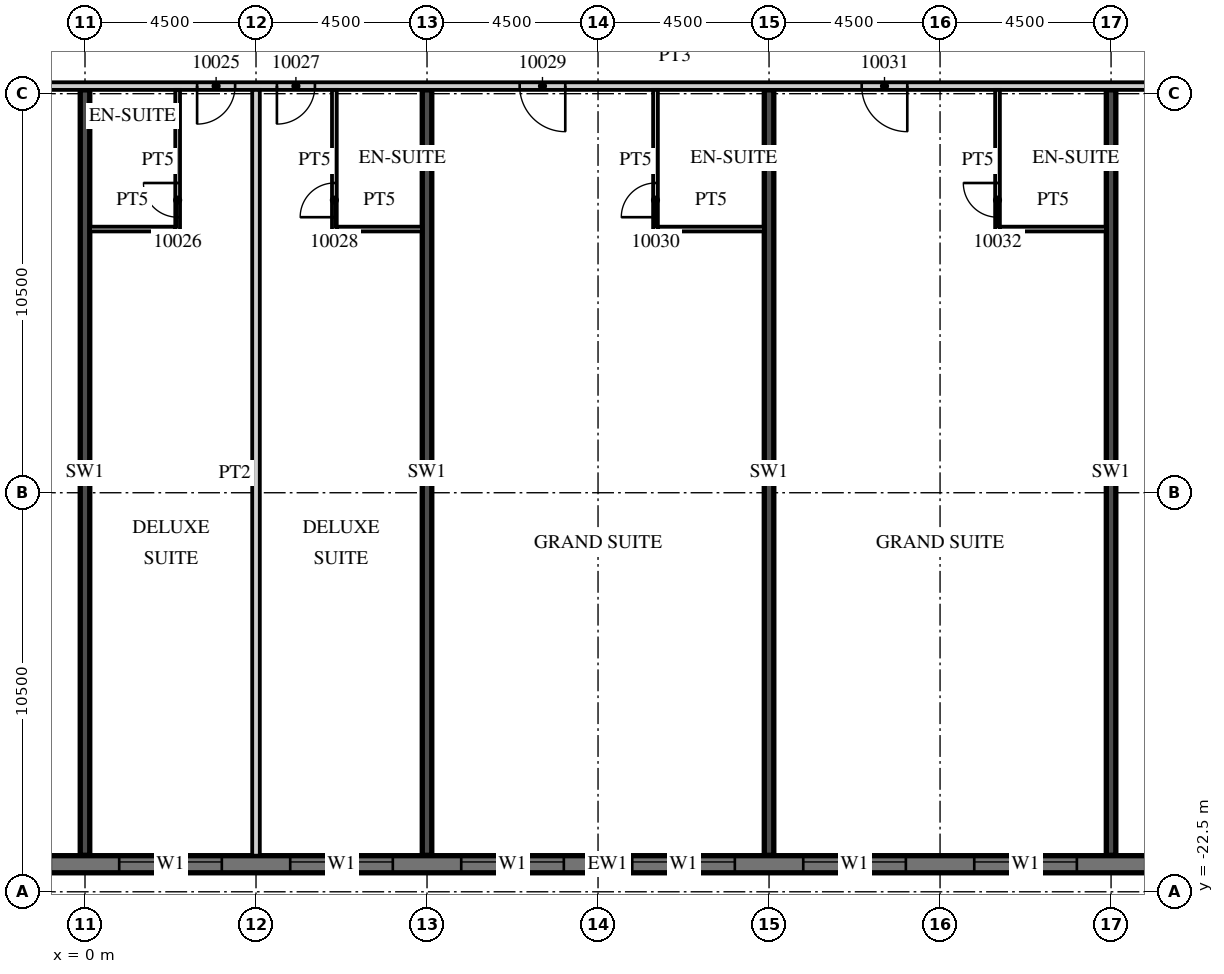
"""IFC4 building model, lengths in metres.
Left out: names, types, materials, properties, quantities, classifications, styles, units other than length and angle.
Written with IfcOpenShell. Run it as: python <this file> out.ifc"""

import sys

from ifc_helpers import new_model, si_unit, direction, frame, frame_2d, origin, place, context, subcontext, project, spatial, rectangle, extrude, element, fill, save


model = new_model("IFC4")
c1 = context("Model", 3, precision=1e-05, world=origin(), true_north=direction((0.0, 1.0)))
c2 = subcontext(c1, "Body", "Model", "MODEL_VIEW")
j1 = project(units=[si_unit("LENGTHUNIT", "METRE"), si_unit("PLANEANGLEUNIT", "RADIAN")], contexts=[c1])
p1 = place(None, origin())
s1 = spatial("IfcSite", under=j1, at=p1, CompositionType="ELEMENT")
p2 = place(p1, origin())
s2 = spatial("IfcBuilding", under=s1, at=p2, CompositionType="ELEMENT")
p3 = place(p2, frame((0.0, 0.0, 63.3)))
s3 = spatial("IfcBuildingStorey", under=s2, at=p3, CompositionType="ELEMENT", Elevation=63.3)
for number, where, z_axis, x_axis in (
    (1, (0.0, -21.54, 0.0), (0.0, 0.0, 1.0), (0.0, 1.0, 0.0)),
    (2, (9.0, -21.54, 0.0), (0.0, 0.0, 1.0), (0.0, 1.0, 0.0)),
    (3, (18.0, -21.54, 0.0), (0.0, 0.0, 1.0), (0.0, 1.0, 0.0)),
    (4, (27.0, -21.54, 0.0), (0.0, 0.0, 1.0), (0.0, 1.0, 0.0)),
):
    element("IfcWall", number, at=place(p3, frame(where, z_axis=z_axis, x_axis=x_axis)), inside=s3, PredefinedType="SHEAR", context=c2, shape_type="SweptSolid", body=[
        extrude(rectangle(XDim=20.14, YDim=0.25, at=frame_2d((10.07, 0.0))), origin(), (0.0, 0.0, 1.0), 3.3),
    ])
p4 = place(p3, frame((-13.5, -21.775, 0.0), z_axis=(0.0, 0.0, 1.0), x_axis=(1.0, 0.0, 0.0)))
e5 = element("IfcWall", 5, at=p4, inside=s3, PredefinedType="SOLIDWALL", context=c2, shape_type="SweptSolid", body=[
    extrude(rectangle(XDim=54.5, YDim=0.45, at=frame_2d((27.25, 0.0))), origin(), (0.0, 0.0, 1.0), 3.02),
])
p5 = place(p4, frame((0.9, 0.0, 0.45)))
e6 = element("IfcOpeningElement", 6, at=p5, cuts=e5, PredefinedType="OPENING", context=c2, shape_type="SweptSolid", body=[
    extrude(rectangle(XDim=2.7, YDim=2.25, at=frame_2d((1.35, 1.125))), frame((0.0, 0.235, 0.0), z_axis=(0.0, -1.0, 0.0), x_axis=(1.0, 0.0, 0.0)), (0.0, 0.0, 1.0), 0.47),
])
p6 = place(p4, frame((5.4, 0.0, 0.45)))
e7 = element("IfcOpeningElement", 7, at=p6, cuts=e5, PredefinedType="OPENING", context=c2, shape_type="SweptSolid", body=[
    extrude(rectangle(XDim=2.7, YDim=2.25, at=frame_2d((1.35, 1.125))), frame((0.0, 0.235, 0.0), z_axis=(0.0, -1.0, 0.0), x_axis=(1.0, 0.0, 0.0)), (0.0, 0.0, 1.0), 0.47),
])
p7 = place(p4, frame((9.9, 0.0, 0.45)))
e8 = element("IfcOpeningElement", 8, at=p7, cuts=e5, PredefinedType="OPENING", context=c2, shape_type="SweptSolid", body=[
    extrude(rectangle(XDim=2.7, YDim=2.25, at=frame_2d((1.35, 1.125))), frame((0.0, 0.235, 0.0), z_axis=(0.0, -1.0, 0.0), x_axis=(1.0, 0.0, 0.0)), (0.0, 0.0, 1.0), 0.47),
])
p8 = place(p4, frame((14.4, 0.0, 0.45)))
e9 = element("IfcOpeningElement", 9, at=p8, cuts=e5, PredefinedType="OPENING", context=c2, shape_type="SweptSolid", body=[
    extrude(rectangle(XDim=2.7, YDim=2.25, at=frame_2d((1.35, 1.125))), frame((0.0, 0.235, 0.0), z_axis=(0.0, -1.0, 0.0), x_axis=(1.0, 0.0, 0.0)), (0.0, 0.0, 1.0), 0.47),
])
p9 = place(p4, frame((18.9, 0.0, 0.45)))
e10 = element("IfcOpeningElement", 10, at=p9, cuts=e5, PredefinedType="OPENING", context=c2, shape_type="SweptSolid", body=[
    extrude(rectangle(XDim=2.7, YDim=2.25, at=frame_2d((1.35, 1.125))), frame((0.0, 0.235, 0.0), z_axis=(0.0, -1.0, 0.0), x_axis=(1.0, 0.0, 0.0)), (0.0, 0.0, 1.0), 0.47),
])
p10 = place(p4, frame((23.4, 0.0, 0.45)))
e11 = element("IfcOpeningElement", 11, at=p10, cuts=e5, PredefinedType="OPENING", context=c2, shape_type="SweptSolid", body=[
    extrude(rectangle(XDim=2.7, YDim=2.25, at=frame_2d((1.35, 1.125))), frame((0.0, 0.235, 0.0), z_axis=(0.0, -1.0, 0.0), x_axis=(1.0, 0.0, 0.0)), (0.0, 0.0, 1.0), 0.47),
])
p11 = place(p4, frame((27.9, 0.0, 0.45)))
e12 = element("IfcOpeningElement", 12, at=p11, cuts=e5, PredefinedType="OPENING", context=c2, shape_type="SweptSolid", body=[
    extrude(rectangle(XDim=2.7, YDim=2.25, at=frame_2d((1.35, 1.125))), frame((0.0, 0.235, 0.0), z_axis=(0.0, -1.0, 0.0), x_axis=(1.0, 0.0, 0.0)), (0.0, 0.0, 1.0), 0.47),
])
p12 = place(p4, frame((32.4, 0.0, 0.45)))
e13 = element("IfcOpeningElement", 13, at=p12, cuts=e5, PredefinedType="OPENING", context=c2, shape_type="SweptSolid", body=[
    extrude(rectangle(XDim=2.7, YDim=2.25, at=frame_2d((1.35, 1.125))), frame((0.0, 0.235, 0.0), z_axis=(0.0, -1.0, 0.0), x_axis=(1.0, 0.0, 0.0)), (0.0, 0.0, 1.0), 0.47),
])
p13 = place(p4, frame((36.9, 0.0, 0.45)))
e14 = element("IfcOpeningElement", 14, at=p13, cuts=e5, PredefinedType="OPENING", context=c2, shape_type="SweptSolid", body=[
    extrude(rectangle(XDim=2.7, YDim=2.25, at=frame_2d((1.35, 1.125))), frame((0.0, 0.235, 0.0), z_axis=(0.0, -1.0, 0.0), x_axis=(1.0, 0.0, 0.0)), (0.0, 0.0, 1.0), 0.47),
])
p14 = place(p4, frame((41.4, 0.0, 0.45)))
e15 = element("IfcOpeningElement", 15, at=p14, cuts=e5, PredefinedType="OPENING", context=c2, shape_type="SweptSolid", body=[
    extrude(rectangle(XDim=2.7, YDim=2.25, at=frame_2d((1.35, 1.125))), frame((0.0, 0.235, 0.0), z_axis=(0.0, -1.0, 0.0), x_axis=(1.0, 0.0, 0.0)), (0.0, 0.0, 1.0), 0.47),
])
p15 = place(p4, frame((45.9, 0.0, 0.45)))
e16 = element("IfcOpeningElement", 16, at=p15, cuts=e5, PredefinedType="OPENING", context=c2, shape_type="SweptSolid", body=[
    extrude(rectangle(XDim=2.7, YDim=2.25, at=frame_2d((1.35, 1.125))), frame((0.0, 0.235, 0.0), z_axis=(0.0, -1.0, 0.0), x_axis=(1.0, 0.0, 0.0)), (0.0, 0.0, 1.0), 0.47),
])
p16 = place(p4, frame((50.4, 0.0, 0.45)))
e17 = element("IfcOpeningElement", 17, at=p16, cuts=e5, PredefinedType="OPENING", context=c2, shape_type="SweptSolid", body=[
    extrude(rectangle(XDim=2.7, YDim=2.25, at=frame_2d((1.35, 1.125))), frame((0.0, 0.235, 0.0), z_axis=(0.0, -1.0, 0.0), x_axis=(1.0, 0.0, 0.0)), (0.0, 0.0, 1.0), 0.47),
])
p17 = place(p3, frame((-13.5, -1.3, 0.0), z_axis=(0.0, 0.0, 1.0), x_axis=(1.0, 0.0, 0.0)))
e18 = element("IfcWall", 18, at=p17, inside=s3, PredefinedType="PARTITIONING", context=c2, shape_type="SweptSolid", body=[
    extrude(rectangle(XDim=58.05, YDim=0.2, at=frame_2d((29.025, 0.0))), origin(), (0.0, 0.0, 1.0), 3.02),
])
p18 = place(p17, frame((2.925, 0.0, 0.0)))
e19 = element("IfcOpeningElement", 19, at=p18, cuts=e18, PredefinedType="OPENING", context=c2, shape_type="SweptSolid", body=[
    extrude(rectangle(XDim=1.0, YDim=2.1, at=frame_2d((0.5, 1.05))), frame((0.0, 0.11, 0.0), z_axis=(0.0, -1.0, 0.0), x_axis=(1.0, 0.0, 0.0)), (0.0, 0.0, 1.0), 0.22),
])
p19 = place(p17, frame((9.863, 0.0, 0.0)))
e20 = element("IfcOpeningElement", 20, at=p19, cuts=e18, PredefinedType="OPENING", context=c2, shape_type="SweptSolid", body=[
    extrude(rectangle(XDim=1.2, YDim=2.1, at=frame_2d((0.6, 1.05))), frame((0.0, 0.11, 0.0), z_axis=(0.0, -1.0, 0.0), x_axis=(1.0, 0.0, 0.0)), (0.0, 0.0, 1.0), 0.22),
])
p20 = place(p17, frame((16.45, 0.0, 0.0)))
e21 = element("IfcOpeningElement", 21, at=p20, cuts=e18, PredefinedType="OPENING", context=c2, shape_type="SweptSolid", body=[
    extrude(rectangle(XDim=1.0, YDim=2.1, at=frame_2d((0.5, 1.05))), frame((0.0, 0.11, 0.0), z_axis=(0.0, -1.0, 0.0), x_axis=(1.0, 0.0, 0.0)), (0.0, 0.0, 1.0), 0.22),
])
p21 = place(p17, frame((18.55, 0.0, 0.0)))
e22 = element("IfcOpeningElement", 22, at=p21, cuts=e18, PredefinedType="OPENING", context=c2, shape_type="SweptSolid", body=[
    extrude(rectangle(XDim=1.0, YDim=2.1, at=frame_2d((0.5, 1.05))), frame((0.0, 0.11, 0.0), z_axis=(0.0, -1.0, 0.0), x_axis=(1.0, 0.0, 0.0)), (0.0, 0.0, 1.0), 0.22),
])
p22 = place(p17, frame((24.938, 0.0, 0.0)))
e23 = element("IfcOpeningElement", 23, at=p22, cuts=e18, PredefinedType="OPENING", context=c2, shape_type="SweptSolid", body=[
    extrude(rectangle(XDim=1.2, YDim=2.1, at=frame_2d((0.6, 1.05))), frame((0.0, 0.11, 0.0), z_axis=(0.0, -1.0, 0.0), x_axis=(1.0, 0.0, 0.0)), (0.0, 0.0, 1.0), 0.22),
])
p23 = place(p17, frame((33.938, 0.0, 0.0)))
e24 = element("IfcOpeningElement", 24, at=p23, cuts=e18, PredefinedType="OPENING", context=c2, shape_type="SweptSolid", body=[
    extrude(rectangle(XDim=1.2, YDim=2.1, at=frame_2d((0.6, 1.05))), frame((0.0, 0.11, 0.0), z_axis=(0.0, -1.0, 0.0), x_axis=(1.0, 0.0, 0.0)), (0.0, 0.0, 1.0), 0.22),
])
p24 = place(p17, frame((42.938, 0.0, 0.0)))
e25 = element("IfcOpeningElement", 25, at=p24, cuts=e18, PredefinedType="OPENING", context=c2, shape_type="SweptSolid", body=[
    extrude(rectangle(XDim=1.2, YDim=2.1, at=frame_2d((0.6, 1.05))), frame((0.0, 0.11, 0.0), z_axis=(0.0, -1.0, 0.0), x_axis=(1.0, 0.0, 0.0)), (0.0, 0.0, 1.0), 0.22),
])
p25 = place(p17, frame((52.425, 0.0, 0.0)))
e26 = element("IfcOpeningElement", 26, at=p25, cuts=e18, PredefinedType="OPENING", context=c2, shape_type="SweptSolid", body=[
    extrude(rectangle(XDim=1.0, YDim=2.1, at=frame_2d((0.5, 1.05))), frame((0.0, 0.11, 0.0), z_axis=(0.0, -1.0, 0.0), x_axis=(1.0, 0.0, 0.0)), (0.0, 0.0, 1.0), 0.22),
])
p26 = place(p17, frame((56.525, 0.0, 0.0)))
e27 = element("IfcOpeningElement", 27, at=p26, cuts=e18, PredefinedType="OPENING", context=c2, shape_type="SweptSolid", body=[
    extrude(rectangle(XDim=1.0, YDim=2.1, at=frame_2d((0.5, 1.05))), frame((0.0, 0.11, 0.0), z_axis=(0.0, -1.0, 0.0), x_axis=(1.0, 0.0, 0.0)), (0.0, 0.0, 1.0), 0.22),
])
p27 = place(p3, frame((4.5, -21.55, 0.0), z_axis=(0.0, 0.0, 1.0), x_axis=(0.0, 1.0, 0.0)))
e28 = element("IfcWall", 28, at=p27, inside=s3, PredefinedType="PARTITIONING", context=c2, shape_type="SweptSolid", body=[
    extrude(rectangle(XDim=20.15, YDim=0.2, at=frame_2d((10.075, 0.0))), origin(), (0.0, 0.0, 1.0), 3.02),
])
p28 = place(p3, frame((2.438, -5.125, 0.0), z_axis=(0.0, 0.0, 1.0), x_axis=(0.0, 1.0, 0.0)))
e29 = element("IfcWall", 29, at=p28, inside=s3, PredefinedType="PARTITIONING", context=c2, shape_type="SweptSolid", body=[
    extrude(rectangle(XDim=3.725, YDim=0.125, at=frame_2d((1.863, 0.0))), origin(), (0.0, 0.0, 1.0), 3.02),
])
p29 = place(p28, frame((0.375, 0.0, 0.0)))
e30 = element("IfcOpeningElement", 30, at=p29, cuts=e29, PredefinedType="OPENING", context=c2, shape_type="SweptSolid", body=[
    extrude(rectangle(XDim=0.9, YDim=2.1, at=frame_2d((0.45, 1.05))), frame((0.0, 0.073, 0.0), z_axis=(0.0, -1.0, 0.0), x_axis=(1.0, 0.0, 0.0)), (0.0, 0.0, 1.0), 0.145),
])
p30 = place(p3, frame((0.125, -5.062, 0.0), z_axis=(0.0, 0.0, 1.0), x_axis=(1.0, 0.0, 0.0)))
e31 = element("IfcWall", 31, at=p30, inside=s3, PredefinedType="PARTITIONING", context=c2, shape_type="SweptSolid", body=[
    extrude(rectangle(XDim=2.25, YDim=0.125, at=frame_2d((1.125, 0.0))), origin(), (0.0, 0.0, 1.0), 3.02),
])
p31 = place(p3, frame((6.562, -5.125, 0.0), z_axis=(0.0, 0.0, 1.0), x_axis=(0.0, 1.0, 0.0)))
e32 = element("IfcWall", 32, at=p31, inside=s3, PredefinedType="PARTITIONING", context=c2, shape_type="SweptSolid", body=[
    extrude(rectangle(XDim=3.725, YDim=0.125, at=frame_2d((1.863, 0.0))), origin(), (0.0, 0.0, 1.0), 3.02),
])
p32 = place(p31, frame((0.375, 0.0, 0.0)))
e33 = element("IfcOpeningElement", 33, at=p32, cuts=e32, PredefinedType="OPENING", context=c2, shape_type="SweptSolid", body=[
    extrude(rectangle(XDim=0.9, YDim=2.1, at=frame_2d((0.45, 1.05))), frame((0.0, 0.073, 0.0), z_axis=(0.0, -1.0, 0.0), x_axis=(1.0, 0.0, 0.0)), (0.0, 0.0, 1.0), 0.145),
])
p33 = place(p3, frame((6.625, -5.062, 0.0), z_axis=(0.0, 0.0, 1.0), x_axis=(1.0, 0.0, 0.0)))
e34 = element("IfcWall", 34, at=p33, inside=s3, PredefinedType="PARTITIONING", context=c2, shape_type="SweptSolid", body=[
    extrude(rectangle(XDim=2.25, YDim=0.125, at=frame_2d((1.125, 0.0))), origin(), (0.0, 0.0, 1.0), 3.02),
])
p34 = place(p3, frame((15.012, -5.125, 0.0), z_axis=(0.0, 0.0, 1.0), x_axis=(0.0, 1.0, 0.0)))
e35 = element("IfcWall", 35, at=p34, inside=s3, PredefinedType="PARTITIONING", context=c2, shape_type="SweptSolid", body=[
    extrude(rectangle(XDim=3.725, YDim=0.125, at=frame_2d((1.863, 0.0))), origin(), (0.0, 0.0, 1.0), 3.02),
])
p35 = place(p34, frame((0.375, 0.0, 0.0)))
e36 = element("IfcOpeningElement", 36, at=p35, cuts=e35, PredefinedType="OPENING", context=c2, shape_type="SweptSolid", body=[
    extrude(rectangle(XDim=0.9, YDim=2.1, at=frame_2d((0.45, 1.05))), frame((0.0, 0.073, 0.0), z_axis=(0.0, -1.0, 0.0), x_axis=(1.0, 0.0, 0.0)), (0.0, 0.0, 1.0), 0.145),
])
p36 = place(p3, frame((15.075, -5.062, 0.0), z_axis=(0.0, 0.0, 1.0), x_axis=(1.0, 0.0, 0.0)))
e37 = element("IfcWall", 37, at=p36, inside=s3, PredefinedType="PARTITIONING", context=c2, shape_type="SweptSolid", body=[
    extrude(rectangle(XDim=2.8, YDim=0.125, at=frame_2d((1.4, 0.0))), origin(), (0.0, 0.0, 1.0), 3.02),
])
p37 = place(p3, frame((24.012, -5.125, 0.0), z_axis=(0.0, 0.0, 1.0), x_axis=(0.0, 1.0, 0.0)))
e38 = element("IfcWall", 38, at=p37, inside=s3, PredefinedType="PARTITIONING", context=c2, shape_type="SweptSolid", body=[
    extrude(rectangle(XDim=3.725, YDim=0.125, at=frame_2d((1.863, 0.0))), origin(), (0.0, 0.0, 1.0), 3.02),
])
p38 = place(p37, frame((0.375, 0.0, 0.0)))
e39 = element("IfcOpeningElement", 39, at=p38, cuts=e38, PredefinedType="OPENING", context=c2, shape_type="SweptSolid", body=[
    extrude(rectangle(XDim=0.9, YDim=2.1, at=frame_2d((0.45, 1.05))), frame((0.0, 0.073, 0.0), z_axis=(0.0, -1.0, 0.0), x_axis=(1.0, 0.0, 0.0)), (0.0, 0.0, 1.0), 0.145),
])
p39 = place(p3, frame((24.075, -5.062, 0.0), z_axis=(0.0, 0.0, 1.0), x_axis=(1.0, 0.0, 0.0)))
e40 = element("IfcWall", 40, at=p39, inside=s3, PredefinedType="PARTITIONING", context=c2, shape_type="SweptSolid", body=[
    extrude(rectangle(XDim=2.8, YDim=0.125, at=frame_2d((1.4, 0.0))), origin(), (0.0, 0.0, 1.0), 3.02),
])
p40 = place(p8, origin())
e41 = element("IfcWindow", 41, at=p40, inside=s3, PartitioningType="SINGLE_PANEL", PredefinedType="WINDOW", context=c2, shape_type="SweptSolid", body=[
    extrude(rectangle(XDim=2.7, YDim=2.25, at=frame_2d((1.35, 1.125))), frame((0.0, 0.09, 0.0), z_axis=(0.0, -1.0, 0.0), x_axis=(1.0, 0.0, 0.0)), (0.0, 0.0, 1.0), 0.06),
])
fill(e9, e41)
p41 = place(p9, origin())
e42 = element("IfcWindow", 42, at=p41, inside=s3, PartitioningType="SINGLE_PANEL", PredefinedType="WINDOW", context=c2, shape_type="SweptSolid", body=[
    extrude(rectangle(XDim=2.7, YDim=2.25, at=frame_2d((1.35, 1.125))), frame((0.0, 0.09, 0.0), z_axis=(0.0, -1.0, 0.0), x_axis=(1.0, 0.0, 0.0)), (0.0, 0.0, 1.0), 0.06),
])
fill(e10, e42)
p42 = place(p10, origin())
e43 = element("IfcWindow", 43, at=p42, inside=s3, PartitioningType="SINGLE_PANEL", PredefinedType="WINDOW", context=c2, shape_type="SweptSolid", body=[
    extrude(rectangle(XDim=2.7, YDim=2.25, at=frame_2d((1.35, 1.125))), frame((0.0, 0.09, 0.0), z_axis=(0.0, -1.0, 0.0), x_axis=(1.0, 0.0, 0.0)), (0.0, 0.0, 1.0), 0.06),
])
fill(e11, e43)
p43 = place(p11, origin())
e44 = element("IfcWindow", 44, at=p43, inside=s3, PartitioningType="SINGLE_PANEL", PredefinedType="WINDOW", context=c2, shape_type="SweptSolid", body=[
    extrude(rectangle(XDim=2.7, YDim=2.25, at=frame_2d((1.35, 1.125))), frame((0.0, 0.09, 0.0), z_axis=(0.0, -1.0, 0.0), x_axis=(1.0, 0.0, 0.0)), (0.0, 0.0, 1.0), 0.06),
])
fill(e12, e44)
p44 = place(p12, origin())
e45 = element("IfcWindow", 45, at=p44, inside=s3, PartitioningType="SINGLE_PANEL", PredefinedType="WINDOW", context=c2, shape_type="SweptSolid", body=[
    extrude(rectangle(XDim=2.7, YDim=2.25, at=frame_2d((1.35, 1.125))), frame((0.0, 0.09, 0.0), z_axis=(0.0, -1.0, 0.0), x_axis=(1.0, 0.0, 0.0)), (0.0, 0.0, 1.0), 0.06),
])
fill(e13, e45)
p45 = place(p13, origin())
e46 = element("IfcWindow", 46, at=p45, inside=s3, PartitioningType="SINGLE_PANEL", PredefinedType="WINDOW", context=c2, shape_type="SweptSolid", body=[
    extrude(rectangle(XDim=2.7, YDim=2.25, at=frame_2d((1.35, 1.125))), frame((0.0, 0.09, 0.0), z_axis=(0.0, -1.0, 0.0), x_axis=(1.0, 0.0, 0.0)), (0.0, 0.0, 1.0), 0.06),
])
fill(e14, e46)
p46 = place(p20, origin())
e47 = element("IfcDoor", 47, at=p46, inside=s3, OperationType="SINGLE_SWING_LEFT", PredefinedType="DOOR", context=c2, shape_type="SweptSolid", body=[
    extrude(rectangle(XDim=1.0, YDim=2.1, at=frame_2d((0.5, 1.05))), frame((0.0, 0.025, 0.0), z_axis=(0.0, -1.0, 0.0), x_axis=(1.0, 0.0, 0.0)), (0.0, 0.0, 1.0), 0.05),
])
fill(e21, e47)
p47 = place(p29, origin())
e48 = element("IfcDoor", 48, at=p47, inside=s3, OperationType="SINGLE_SWING_RIGHT", PredefinedType="DOOR", context=c2, shape_type="SweptSolid", body=[
    extrude(rectangle(XDim=0.9, YDim=2.1, at=frame_2d((0.45, 1.05))), frame((0.0, 0.025, 0.0), z_axis=(0.0, -1.0, 0.0), x_axis=(1.0, 0.0, 0.0)), (0.0, 0.0, 1.0), 0.05),
])
fill(e30, e48)
p48 = place(p21, origin())
e49 = element("IfcDoor", 49, at=p48, inside=s3, OperationType="SINGLE_SWING_LEFT", PredefinedType="DOOR", context=c2, shape_type="SweptSolid", body=[
    extrude(rectangle(XDim=1.0, YDim=2.1, at=frame_2d((0.5, 1.05))), frame((0.0, 0.025, 0.0), z_axis=(0.0, -1.0, 0.0), x_axis=(1.0, 0.0, 0.0)), (0.0, 0.0, 1.0), 0.05),
])
fill(e22, e49)
p49 = place(p32, origin())
e50 = element("IfcDoor", 50, at=p49, inside=s3, OperationType="SINGLE_SWING_LEFT", PredefinedType="DOOR", context=c2, shape_type="SweptSolid", body=[
    extrude(rectangle(XDim=0.9, YDim=2.1, at=frame_2d((0.45, 1.05))), frame((0.0, 0.025, 0.0), z_axis=(0.0, -1.0, 0.0), x_axis=(1.0, 0.0, 0.0)), (0.0, 0.0, 1.0), 0.05),
])
fill(e33, e50)
p50 = place(p22, origin())
e51 = element("IfcDoor", 51, at=p50, inside=s3, OperationType="SINGLE_SWING_RIGHT", PredefinedType="DOOR", context=c2, shape_type="SweptSolid", body=[
    extrude(rectangle(XDim=1.2, YDim=2.1, at=frame_2d((0.6, 1.05))), frame((0.0, 0.025, 0.0), z_axis=(0.0, -1.0, 0.0), x_axis=(1.0, 0.0, 0.0)), (0.0, 0.0, 1.0), 0.05),
])
fill(e23, e51)
p51 = place(p35, origin())
e52 = element("IfcDoor", 52, at=p51, inside=s3, OperationType="SINGLE_SWING_LEFT", PredefinedType="DOOR", context=c2, shape_type="SweptSolid", body=[
    extrude(rectangle(XDim=0.9, YDim=2.1, at=frame_2d((0.45, 1.05))), frame((0.0, 0.025, 0.0), z_axis=(0.0, -1.0, 0.0), x_axis=(1.0, 0.0, 0.0)), (0.0, 0.0, 1.0), 0.05),
])
fill(e36, e52)
p52 = place(p23, origin())
e53 = element("IfcDoor", 53, at=p52, inside=s3, OperationType="SINGLE_SWING_RIGHT", PredefinedType="DOOR", context=c2, shape_type="SweptSolid", body=[
    extrude(rectangle(XDim=1.2, YDim=2.1, at=frame_2d((0.6, 1.05))), frame((0.0, 0.025, 0.0), z_axis=(0.0, -1.0, 0.0), x_axis=(1.0, 0.0, 0.0)), (0.0, 0.0, 1.0), 0.05),
])
fill(e24, e53)
p53 = place(p38, origin())
e54 = element("IfcDoor", 54, at=p53, inside=s3, OperationType="SINGLE_SWING_RIGHT", PredefinedType="DOOR", context=c2, shape_type="SweptSolid", body=[
    extrude(rectangle(XDim=0.9, YDim=2.1, at=frame_2d((0.45, 1.05))), frame((0.0, 0.025, 0.0), z_axis=(0.0, -1.0, 0.0), x_axis=(1.0, 0.0, 0.0)), (0.0, 0.0, 1.0), 0.05),
])
fill(e39, e54)
save(model, sys.argv[1])
